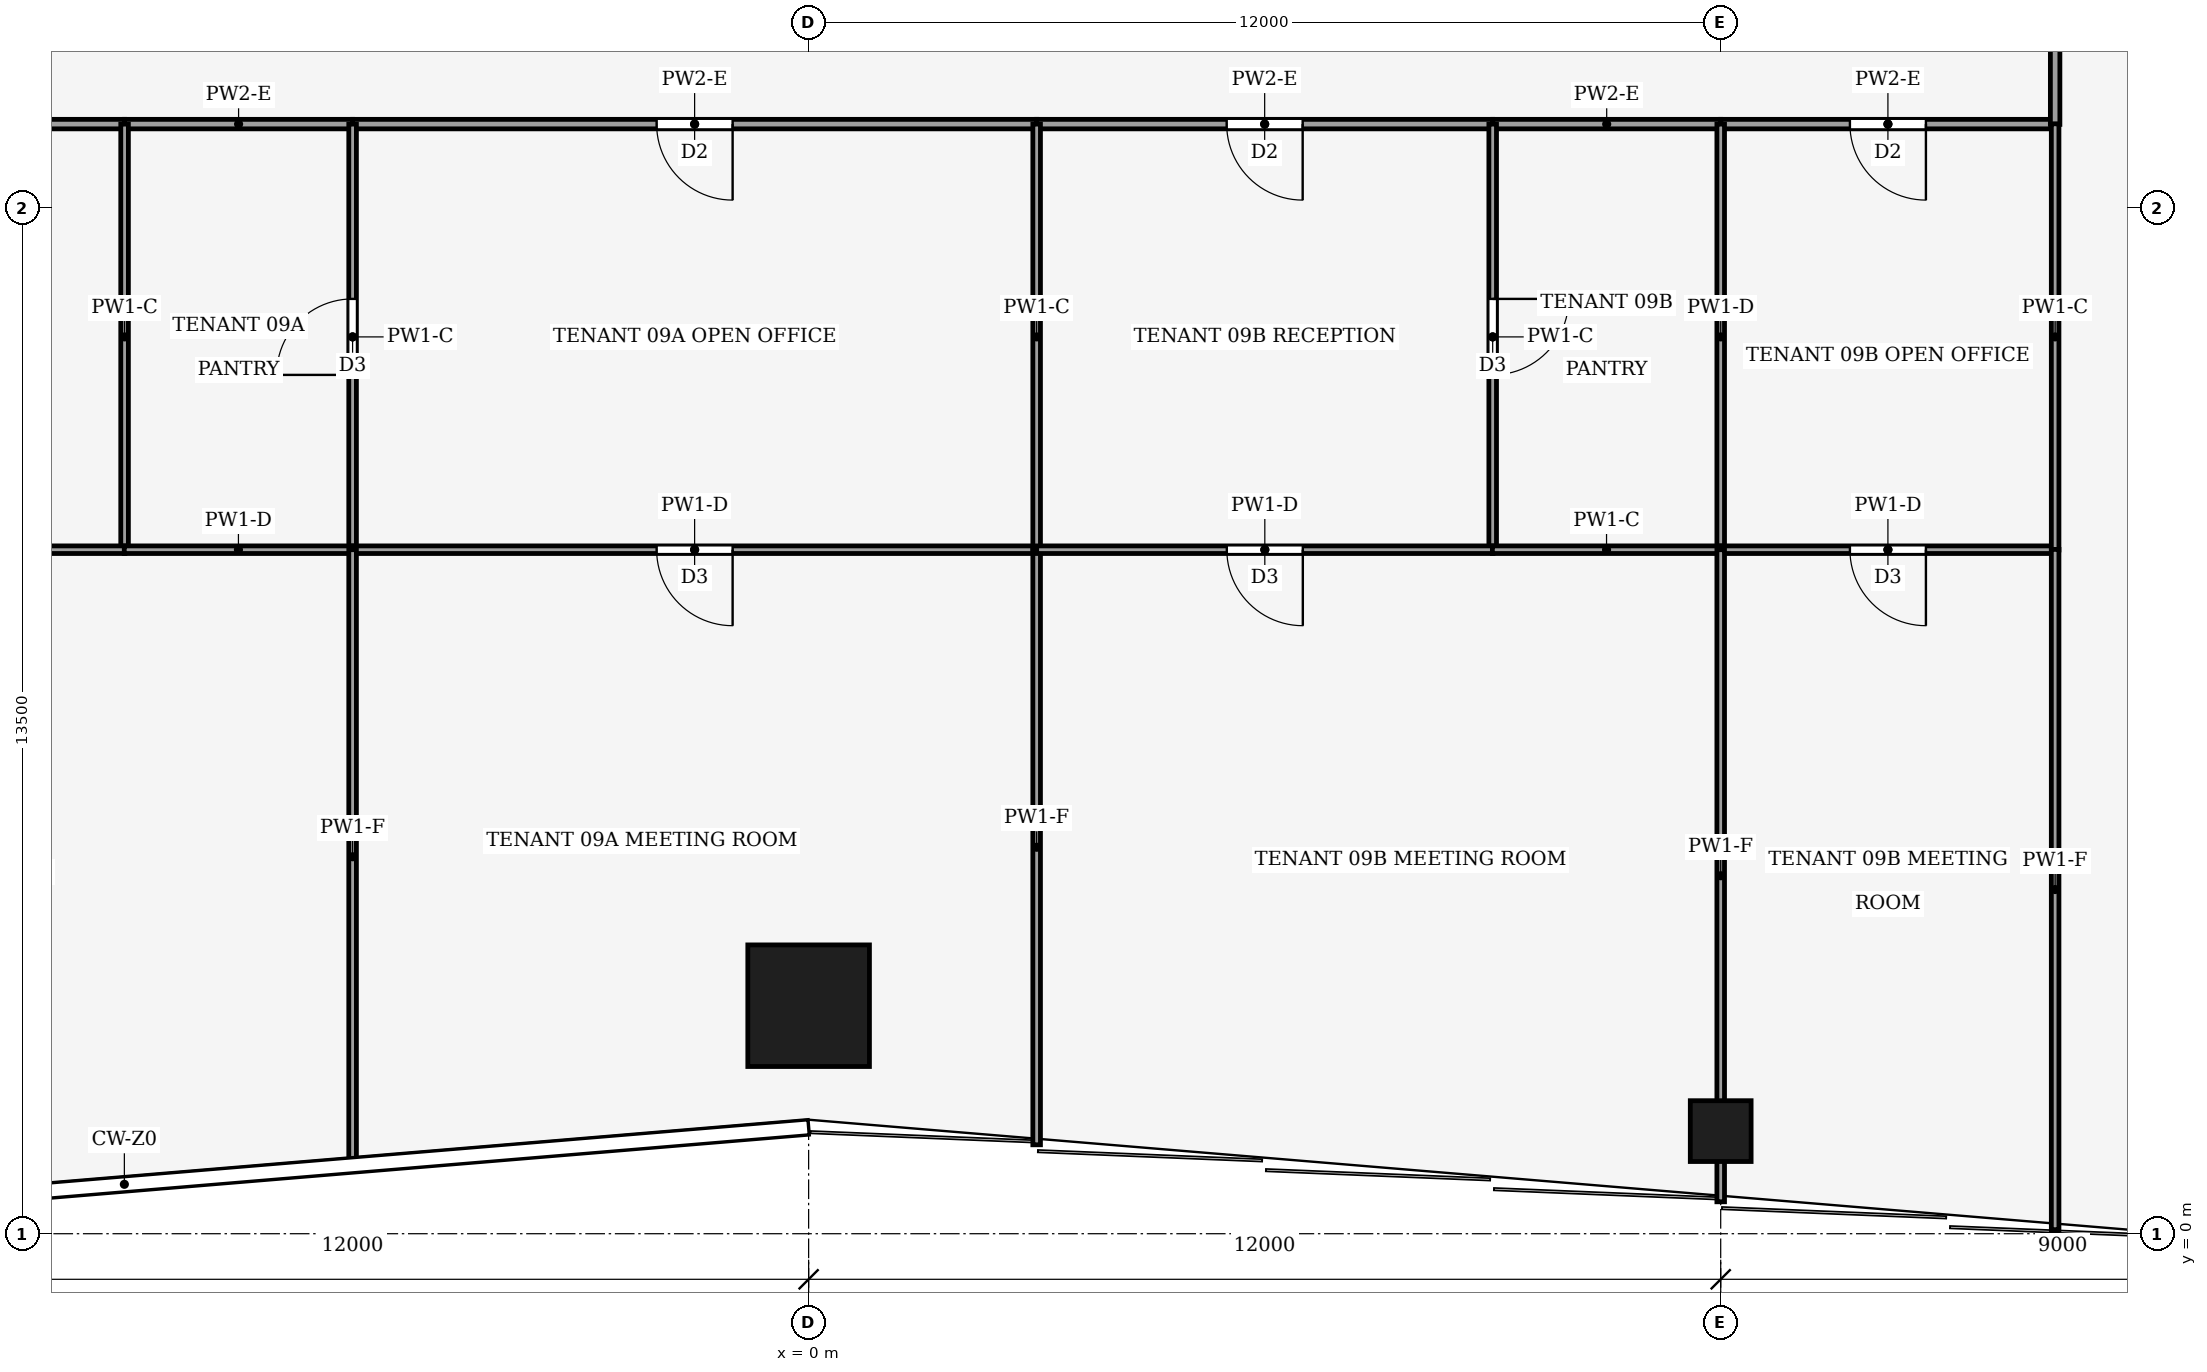
"""IFC4 building model, lengths in metres.
Left out: names, types, materials, properties, quantities, classifications, styles, units other than length and angle.
Written with IfcOpenShell. Run it as: python <this file> out.ifc"""

import sys

from ifc_helpers import new_model, si_unit, direction, frame, frame_2d, origin, origin_2d, place, context, subcontext, project, spatial, rectangle, hollow_rectangle, extrude, element, fill, save


model = new_model("IFC4")
c1 = context("Model", 3, precision=1e-05, world=origin(), true_north=direction((0.0, 1.0)))
c2 = subcontext(c1, "Body", "Model", "MODEL_VIEW")
j1 = project(units=[si_unit("LENGTHUNIT", "METRE"), si_unit("PLANEANGLEUNIT", "RADIAN")], contexts=[c1])
p1 = place(None, origin())
s1 = spatial("IfcSite", under=j1, at=p1, CompositionType="ELEMENT")
p2 = place(p1, origin())
s2 = spatial("IfcBuilding", under=s1, at=p2, CompositionType="ELEMENT")
p3 = place(p2, frame((0.0, 0.0, 42.0)))
s3 = spatial("IfcBuildingStorey", under=s2, at=p3, CompositionType="ELEMENT", Elevation=42.0)
p4 = place(p3, frame((0.0, 3.0, 0.0), z_axis=(0.0, 0.0, 1.0), x_axis=(1.0, 0.0, 0.0)))
e1 = element("IfcColumn", 1, at=p4, inside=s3, PredefinedType="COLUMN", context=c2, shape_type="SweptSolid", body=[
    extrude(hollow_rectangle(XDim=1.6, YDim=1.6, WallThickness=0.09, at=origin_2d()), origin(), (0.0, 0.0, 1.0), 4.0),
])
p5 = place(p3, frame((12.0, 1.35, 0.0), z_axis=(0.0, 0.0, 1.0), x_axis=(1.0, 0.0, 0.0)))
e2 = element("IfcColumn", 2, at=p5, inside=s3, PredefinedType="COLUMN", context=c2, shape_type="SweptSolid", body=[
    extrude(hollow_rectangle(XDim=0.8, YDim=0.8, WallThickness=0.04, at=origin_2d()), origin(), (0.0, 0.0, 1.0), 4.0),
])
p6 = place(p3, frame((-9.0, 14.6, 0.0), z_axis=(0.0, 0.0, 1.0), x_axis=(-1.0, 0.0, 0.0)))
e3 = element("IfcWall", 3, at=p6, inside=s3, PredefinedType="PARTITIONING", context=c2, shape_type="SweptSolid", body=[
    extrude(rectangle(XDim=7.4, YDim=0.125, at=frame_2d((3.7, 0.0))), origin(), (0.0, 0.0, 1.0), 3.29),
])
p7 = place(p6, frame((3.2, 0.0, 0.0)))
e4 = element("IfcOpeningElement", 4, at=p7, cuts=e3, PredefinedType="OPENING", context=c2, shape_type="SweptSolid", body=[
    extrude(rectangle(XDim=1.0, YDim=2.1, at=frame_2d((0.5, 1.05))), frame((0.0, 0.073, 0.0), z_axis=(0.0, -1.0, 0.0), x_axis=(1.0, 0.0, 0.0)), (0.0, 0.0, 1.0), 0.145),
])
p8 = place(p3, frame((-9.0, 14.6, 0.0), z_axis=(0.0, 0.0, 1.0), x_axis=(1.0, 0.0, 0.0)))
e5 = element("IfcWall", 5, at=p8, inside=s3, PredefinedType="PARTITIONING", context=c2, shape_type="SweptSolid", body=[
    extrude(rectangle(XDim=3.0, YDim=0.125, at=frame_2d((1.5, 0.0))), origin(), (0.0, 0.0, 1.0), 3.29),
])
p9 = place(p3, frame((3.0, 14.6, 0.0), z_axis=(0.0, 0.0, 1.0), x_axis=(-1.0, 0.0, 0.0)))
e6 = element("IfcWall", 6, at=p9, inside=s3, PredefinedType="PARTITIONING", context=c2, shape_type="SweptSolid", body=[
    extrude(rectangle(XDim=9.0, YDim=0.125, at=frame_2d((4.5, 0.0))), origin(), (0.0, 0.0, 1.0), 3.29),
])
p10 = place(p9, frame((4.0, 0.0, 0.0)))
e7 = element("IfcOpeningElement", 7, at=p10, cuts=e6, PredefinedType="OPENING", context=c2, shape_type="SweptSolid", body=[
    extrude(rectangle(XDim=1.0, YDim=2.1, at=frame_2d((0.5, 1.05))), frame((0.0, 0.073, 0.0), z_axis=(0.0, -1.0, 0.0), x_axis=(1.0, 0.0, 0.0)), (0.0, 0.0, 1.0), 0.145),
])
p11 = place(p3, frame((9.0, 14.6, 0.0), z_axis=(0.0, 0.0, 1.0), x_axis=(-1.0, 0.0, 0.0)))
e8 = element("IfcWall", 8, at=p11, inside=s3, PredefinedType="PARTITIONING", context=c2, shape_type="SweptSolid", body=[
    extrude(rectangle(XDim=6.0, YDim=0.125, at=frame_2d((3.0, 0.0))), origin(), (0.0, 0.0, 1.0), 3.29),
])
p12 = place(p11, frame((2.5, 0.0, 0.0)))
e9 = element("IfcOpeningElement", 9, at=p12, cuts=e8, PredefinedType="OPENING", context=c2, shape_type="SweptSolid", body=[
    extrude(rectangle(XDim=1.0, YDim=2.1, at=frame_2d((0.5, 1.05))), frame((0.0, 0.073, 0.0), z_axis=(0.0, -1.0, 0.0), x_axis=(1.0, 0.0, 0.0)), (0.0, 0.0, 1.0), 0.145),
])
p13 = place(p3, frame((9.0, 14.6, 0.0), z_axis=(0.0, 0.0, 1.0), x_axis=(1.0, 0.0, 0.0)))
e10 = element("IfcWall", 10, at=p13, inside=s3, PredefinedType="PARTITIONING", context=c2, shape_type="SweptSolid", body=[
    extrude(rectangle(XDim=3.0, YDim=0.125, at=frame_2d((1.5, 0.0))), origin(), (0.0, 0.0, 1.0), 3.29),
])
p14 = place(p3, frame((16.4, 14.6, 0.0), z_axis=(0.0, 0.0, 1.0), x_axis=(-1.0, 0.0, 0.0)))
e11 = element("IfcWall", 11, at=p14, inside=s3, PredefinedType="PARTITIONING", context=c2, shape_type="SweptSolid", body=[
    extrude(rectangle(XDim=4.4, YDim=0.125, at=frame_2d((2.2, 0.0))), origin(), (0.0, 0.0, 1.0), 3.29),
])
p15 = place(p14, frame((1.7, 0.0, 0.0)))
e12 = element("IfcOpeningElement", 12, at=p15, cuts=e11, PredefinedType="OPENING", context=c2, shape_type="SweptSolid", body=[
    extrude(rectangle(XDim=1.0, YDim=2.1, at=frame_2d((0.5, 1.05))), frame((0.0, 0.073, 0.0), z_axis=(0.0, -1.0, 0.0), x_axis=(1.0, 0.0, 0.0)), (0.0, 0.0, 1.0), 0.145),
])
p16 = place(p3, frame((16.4, 24.0, 0.0), z_axis=(0.0, 0.0, 1.0), x_axis=(0.0, -1.0, 0.0)))
e13 = element("IfcWall", 13, at=p16, inside=s3, PredefinedType="PARTITIONING", context=c2, shape_type="SweptSolid", body=[
    extrude(rectangle(XDim=9.404, YDim=0.125, at=frame_2d((4.702, 0.0))), origin(), (0.0, 0.0, 1.0), 3.14),
])
p17 = place(p16, frame((4.202, 0.0, 0.0)))
e14 = element("IfcOpeningElement", 14, at=p17, cuts=e13, PredefinedType="OPENING", context=c2, shape_type="SweptSolid", body=[
    extrude(rectangle(XDim=1.0, YDim=2.1, at=frame_2d((0.5, 1.05))), frame((0.0, 0.073, 0.0), z_axis=(0.0, -1.0, 0.0), x_axis=(1.0, 0.0, 0.0)), (0.0, 0.0, 1.0), 0.145),
])
p18 = place(p3, frame((-9.0, 9.0, 0.0), z_axis=(0.0, 0.0, 1.0), x_axis=(0.0, 1.0, 0.0)))
e15 = element("IfcWall", 15, at=p18, inside=s3, PredefinedType="PARTITIONING", context=c2, shape_type="SweptSolid", body=[
    extrude(rectangle(XDim=5.6, YDim=0.1, at=frame_2d((2.8, 0.0))), origin(), (0.0, 0.0, 1.0), 3.87),
])
p19 = place(p3, frame((-8.996, 9.0, 0.0), z_axis=(0.0, 0.0, 1.0), x_axis=(-1.0, 0.0, 0.0)))
e16 = element("IfcWall", 16, at=p19, inside=s3, PredefinedType="PARTITIONING", context=c2, shape_type="SweptSolid", body=[
    extrude(rectangle(XDim=7.404, YDim=0.1, at=frame_2d((3.702, 0.0))), origin(), (0.0, 0.0, 1.0), 3.29),
])
p20 = place(p19, frame((3.202, 0.0, 0.0)))
e17 = element("IfcOpeningElement", 17, at=p20, cuts=e16, PredefinedType="OPENING", context=c2, shape_type="SweptSolid", body=[
    extrude(rectangle(XDim=1.0, YDim=2.1, at=frame_2d((0.5, 1.05))), frame((0.0, 0.06, 0.0), z_axis=(0.0, -1.0, 0.0), x_axis=(1.0, 0.0, 0.0)), (0.0, 0.0, 1.0), 0.12),
])
p21 = place(p3, frame((-6.0, 9.0, 0.0), z_axis=(0.0, 0.0, 1.0), x_axis=(0.0, 1.0, 0.0)))
e18 = element("IfcWall", 18, at=p21, inside=s3, PredefinedType="PARTITIONING", context=c2, shape_type="SweptSolid", body=[
    extrude(rectangle(XDim=5.6, YDim=0.1, at=frame_2d((2.8, 0.0))), origin(), (0.0, 0.0, 1.0), 3.87),
])
p22 = place(p21, frame((2.3, 0.0, 0.0)))
e19 = element("IfcOpeningElement", 19, at=p22, cuts=e18, PredefinedType="OPENING", context=c2, shape_type="SweptSolid", body=[
    extrude(rectangle(XDim=1.0, YDim=2.1, at=frame_2d((0.5, 1.05))), frame((0.0, 0.06, 0.0), z_axis=(0.0, -1.0, 0.0), x_axis=(1.0, 0.0, 0.0)), (0.0, 0.0, 1.0), 0.12),
])
p23 = place(p3, frame((-9.004, 9.0, 0.0), z_axis=(0.0, 0.0, 1.0), x_axis=(1.0, 0.0, 0.0)))
e20 = element("IfcWall", 20, at=p23, inside=s3, PredefinedType="PARTITIONING", context=c2, shape_type="SweptSolid", body=[
    extrude(rectangle(XDim=3.004, YDim=0.1, at=frame_2d((1.502, 0.0))), origin(), (0.0, 0.0, 1.0), 3.29),
])
p24 = place(p3, frame((3.0, 9.0, 0.0), z_axis=(0.0, 0.0, 1.0), x_axis=(-1.0, 0.0, 0.0)))
e21 = element("IfcWall", 21, at=p24, inside=s3, PredefinedType="PARTITIONING", context=c2, shape_type="SweptSolid", body=[
    extrude(rectangle(XDim=9.0, YDim=0.1, at=frame_2d((4.5, 0.0))), origin(), (0.0, 0.0, 1.0), 3.29),
])
p25 = place(p24, frame((4.0, 0.0, 0.0)))
e22 = element("IfcOpeningElement", 22, at=p25, cuts=e21, PredefinedType="OPENING", context=c2, shape_type="SweptSolid", body=[
    extrude(rectangle(XDim=1.0, YDim=2.1, at=frame_2d((0.5, 1.05))), frame((0.0, 0.06, 0.0), z_axis=(0.0, -1.0, 0.0), x_axis=(1.0, 0.0, 0.0)), (0.0, 0.0, 1.0), 0.12),
])
p26 = place(p3, frame((3.0, 9.0, 0.0), z_axis=(0.0, 0.0, 1.0), x_axis=(0.0, 1.0, 0.0)))
e23 = element("IfcWall", 23, at=p26, inside=s3, PredefinedType="PARTITIONING", context=c2, shape_type="SweptSolid", body=[
    extrude(rectangle(XDim=5.6, YDim=0.1, at=frame_2d((2.8, 0.0))), origin(), (0.0, 0.0, 1.0), 3.87),
])
p27 = place(p3, frame((-6.0, 0.92, 0.0), z_axis=(0.0, 0.0, 1.0), x_axis=(0.0, 1.0, 0.0)))
e24 = element("IfcWall", 24, at=p27, inside=s3, PredefinedType="PARTITIONING", context=c2, shape_type="SweptSolid", body=[
    extrude(rectangle(XDim=8.08, YDim=0.1, at=frame_2d((4.04, 0.0))), origin(), (0.0, 0.0, 1.0), 3.04),
])
p28 = place(p3, frame((3.0, 1.17, 0.0), z_axis=(0.0, 0.0, 1.0), x_axis=(0.0, 1.0, 0.0)))
e25 = element("IfcWall", 25, at=p28, inside=s3, PredefinedType="PARTITIONING", context=c2, shape_type="SweptSolid", body=[
    extrude(rectangle(XDim=7.83, YDim=0.1, at=frame_2d((3.915, 0.0))), origin(), (0.0, 0.0, 1.0), 3.04),
])
p29 = place(p3, frame((9.0, 14.6, 0.0), z_axis=(0.0, 0.0, 1.0), x_axis=(0.0, -1.0, 0.0)))
e26 = element("IfcWall", 26, at=p29, inside=s3, PredefinedType="PARTITIONING", context=c2, shape_type="SweptSolid", body=[
    extrude(rectangle(XDim=5.6, YDim=0.1, at=frame_2d((2.8, 0.0))), origin(), (0.0, 0.0, 1.0), 3.87),
])
p30 = place(p29, frame((2.3, 0.0, 0.0)))
e27 = element("IfcOpeningElement", 27, at=p30, cuts=e26, PredefinedType="OPENING", context=c2, shape_type="SweptSolid", body=[
    extrude(rectangle(XDim=1.0, YDim=2.1, at=frame_2d((0.5, 1.05))), frame((0.0, 0.06, 0.0), z_axis=(0.0, -1.0, 0.0), x_axis=(1.0, 0.0, 0.0)), (0.0, 0.0, 1.0), 0.12),
])
p31 = place(p3, frame((9.004, 9.0, 0.0), z_axis=(0.0, 0.0, 1.0), x_axis=(-1.0, 0.0, 0.0)))
e28 = element("IfcWall", 28, at=p31, inside=s3, PredefinedType="PARTITIONING", context=c2, shape_type="SweptSolid", body=[
    extrude(rectangle(XDim=6.004, YDim=0.1, at=frame_2d((3.002, 0.0))), origin(), (0.0, 0.0, 1.0), 3.29),
])
p32 = place(p31, frame((2.502, 0.0, 0.0)))
e29 = element("IfcOpeningElement", 29, at=p32, cuts=e28, PredefinedType="OPENING", context=c2, shape_type="SweptSolid", body=[
    extrude(rectangle(XDim=1.0, YDim=2.1, at=frame_2d((0.5, 1.05))), frame((0.0, 0.06, 0.0), z_axis=(0.0, -1.0, 0.0), x_axis=(1.0, 0.0, 0.0)), (0.0, 0.0, 1.0), 0.12),
])
p33 = place(p3, frame((12.0, 9.0, 0.0), z_axis=(0.0, 0.0, 1.0), x_axis=(0.0, 1.0, 0.0)))
e30 = element("IfcWall", 30, at=p33, inside=s3, PredefinedType="PARTITIONING", context=c2, shape_type="SweptSolid", body=[
    extrude(rectangle(XDim=5.6, YDim=0.1, at=frame_2d((2.8, 0.0))), origin(), (0.0, 0.0, 1.0), 3.29),
])
p34 = place(p3, frame((8.996, 9.0, 0.0), z_axis=(0.0, 0.0, 1.0), x_axis=(1.0, 0.0, 0.0)))
e31 = element("IfcWall", 31, at=p34, inside=s3, PredefinedType="PARTITIONING", context=c2, shape_type="SweptSolid", body=[
    extrude(rectangle(XDim=3.004, YDim=0.1, at=frame_2d((1.502, 0.0))), origin(), (0.0, 0.0, 1.0), 3.87),
])
p35 = place(p3, frame((16.4, 9.0, 0.0), z_axis=(0.0, 0.0, 1.0), x_axis=(-1.0, 0.0, 0.0)))
e32 = element("IfcWall", 32, at=p35, inside=s3, PredefinedType="PARTITIONING", context=c2, shape_type="SweptSolid", body=[
    extrude(rectangle(XDim=4.4, YDim=0.1, at=frame_2d((2.2, 0.0))), origin(), (0.0, 0.0, 1.0), 3.29),
])
p36 = place(p35, frame((1.7, 0.0, 0.0)))
e33 = element("IfcOpeningElement", 33, at=p36, cuts=e32, PredefinedType="OPENING", context=c2, shape_type="SweptSolid", body=[
    extrude(rectangle(XDim=1.0, YDim=2.1, at=frame_2d((0.5, 1.05))), frame((0.0, 0.06, 0.0), z_axis=(0.0, -1.0, 0.0), x_axis=(1.0, 0.0, 0.0)), (0.0, 0.0, 1.0), 0.12),
])
p37 = place(p3, frame((16.4, 8.996, 0.0), z_axis=(0.0, 0.0, 1.0), x_axis=(0.0, 1.0, 0.0)))
e34 = element("IfcWall", 34, at=p37, inside=s3, PredefinedType="PARTITIONING", context=c2, shape_type="SweptSolid", body=[
    extrude(rectangle(XDim=5.608, YDim=0.1, at=frame_2d((2.804, 0.0))), origin(), (0.0, 0.0, 1.0), 3.87),
])
p38 = place(p3, frame((12.0, 0.42, 0.0), z_axis=(0.0, 0.0, 1.0), x_axis=(0.0, 1.0, 0.0)))
e35 = element("IfcWall", 35, at=p38, inside=s3, PredefinedType="PARTITIONING", context=c2, shape_type="SweptSolid", body=[
    extrude(rectangle(XDim=8.58, YDim=0.1, at=frame_2d((4.29, 0.0))), origin(), (0.0, 0.0, 1.0), 3.04),
])
p39 = place(p3, frame((16.4, 0.053, 0.0), z_axis=(0.0, 0.0, 1.0), x_axis=(0.0, 1.0, 0.0)))
e36 = element("IfcWall", 36, at=p39, inside=s3, PredefinedType="PARTITIONING", context=c2, shape_type="SweptSolid", body=[
    extrude(rectangle(XDim=8.951, YDim=0.1, at=frame_2d((4.475, 0.0))), origin(), (0.0, 0.0, 1.0), 3.04),
])
p40 = place(p10, origin())
e37 = element("IfcDoor", 37, at=p40, inside=s3, OperationType="SINGLE_SWING_RIGHT", PredefinedType="DOOR", context=c2, shape_type="SweptSolid", body=[
    extrude(rectangle(XDim=1.0, YDim=2.1, at=frame_2d((0.5, 1.05))), frame((0.0, 0.025, 0.0), z_axis=(0.0, -1.0, 0.0), x_axis=(1.0, 0.0, 0.0)), (0.0, 0.0, 1.0), 0.05),
])
fill(e7, e37)
p41 = place(p12, origin())
e38 = element("IfcDoor", 38, at=p41, inside=s3, OperationType="SINGLE_SWING_LEFT", PredefinedType="DOOR", context=c2, shape_type="SweptSolid", body=[
    extrude(rectangle(XDim=1.0, YDim=2.1, at=frame_2d((0.5, 1.05))), frame((0.0, 0.025, 0.0), z_axis=(0.0, -1.0, 0.0), x_axis=(1.0, 0.0, 0.0)), (0.0, 0.0, 1.0), 0.05),
])
fill(e9, e38)
p42 = place(p15, origin())
e39 = element("IfcDoor", 39, at=p42, inside=s3, OperationType="SINGLE_SWING_RIGHT", PredefinedType="DOOR", context=c2, shape_type="SweptSolid", body=[
    extrude(rectangle(XDim=1.0, YDim=2.1, at=frame_2d((0.5, 1.05))), frame((0.0, 0.025, 0.0), z_axis=(0.0, -1.0, 0.0), x_axis=(1.0, 0.0, 0.0)), (0.0, 0.0, 1.0), 0.05),
])
fill(e12, e39)
p43 = place(p22, origin())
e40 = element("IfcDoor", 40, at=p43, inside=s3, OperationType="SINGLE_SWING_RIGHT", PredefinedType="DOOR", context=c2, shape_type="SweptSolid", body=[
    extrude(rectangle(XDim=1.0, YDim=2.1, at=frame_2d((0.5, 1.05))), frame((0.0, 0.025, 0.0), z_axis=(0.0, -1.0, 0.0), x_axis=(1.0, 0.0, 0.0)), (0.0, 0.0, 1.0), 0.05),
])
fill(e19, e40)
p44 = place(p25, origin())
e41 = element("IfcDoor", 41, at=p44, inside=s3, OperationType="SINGLE_SWING_LEFT", PredefinedType="DOOR", context=c2, shape_type="SweptSolid", body=[
    extrude(rectangle(XDim=1.0, YDim=2.1, at=frame_2d((0.5, 1.05))), frame((0.0, 0.025, 0.0), z_axis=(0.0, -1.0, 0.0), x_axis=(1.0, 0.0, 0.0)), (0.0, 0.0, 1.0), 0.05),
])
fill(e22, e41)
p45 = place(p30, origin())
e42 = element("IfcDoor", 42, at=p45, inside=s3, OperationType="SINGLE_SWING_RIGHT", PredefinedType="DOOR", context=c2, shape_type="SweptSolid", body=[
    extrude(rectangle(XDim=1.0, YDim=2.1, at=frame_2d((0.5, 1.05))), frame((0.0, 0.025, 0.0), z_axis=(0.0, -1.0, 0.0), x_axis=(1.0, 0.0, 0.0)), (0.0, 0.0, 1.0), 0.05),
])
fill(e27, e42)
p46 = place(p32, origin())
e43 = element("IfcDoor", 43, at=p46, inside=s3, OperationType="SINGLE_SWING_LEFT", PredefinedType="DOOR", context=c2, shape_type="SweptSolid", body=[
    extrude(rectangle(XDim=1.0, YDim=2.1, at=frame_2d((0.5, 1.05))), frame((0.0, 0.025, 0.0), z_axis=(0.0, -1.0, 0.0), x_axis=(1.0, 0.0, 0.0)), (0.0, 0.0, 1.0), 0.05),
])
fill(e29, e43)
p47 = place(p36, origin())
e44 = element("IfcDoor", 44, at=p47, inside=s3, OperationType="SINGLE_SWING_RIGHT", PredefinedType="DOOR", context=c2, shape_type="SweptSolid", body=[
    extrude(rectangle(XDim=1.0, YDim=2.1, at=frame_2d((0.5, 1.05))), frame((0.0, 0.025, 0.0), z_axis=(0.0, -1.0, 0.0), x_axis=(1.0, 0.0, 0.0)), (0.0, 0.0, 1.0), 0.05),
])
fill(e33, e44)
save(model, sys.argv[1])
